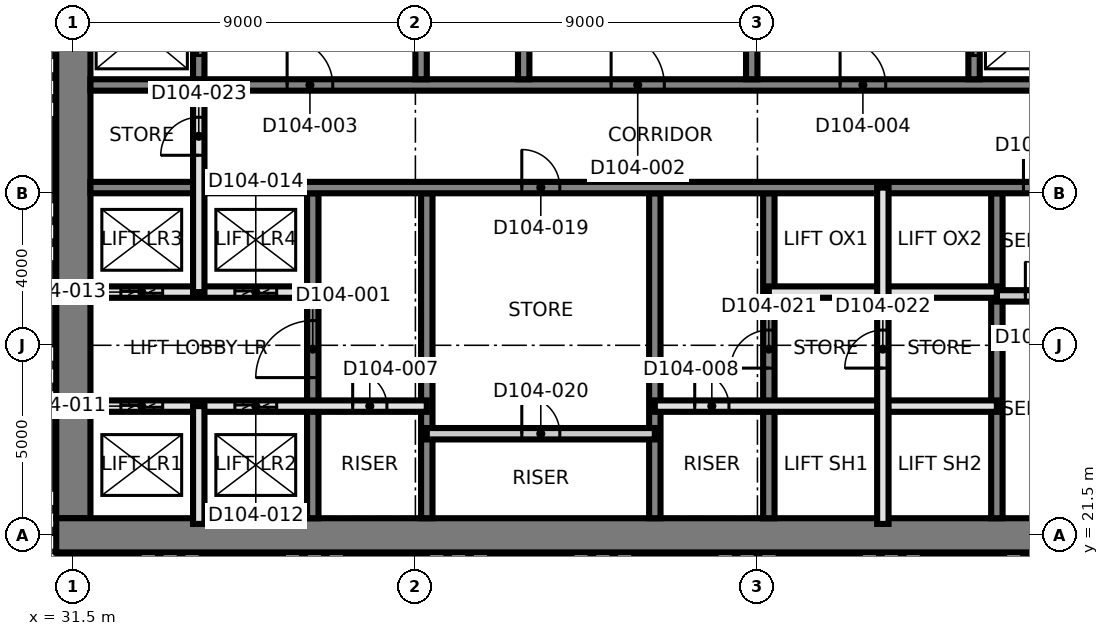
"""IFC4 building model, lengths in metres.
Left out: names, types, materials, properties, quantities, classifications, styles, units other than length and angle.
Written with IfcOpenShell. Run it as: python <this file> out.ifc"""

import sys

from ifc_helpers import new_model, si_unit, direction, frame, frame_2d, origin, place, context, subcontext, project, spatial, rectangle, extrude, element, fill, save


model = new_model("IFC4")
c1 = context("Model", 3, precision=1e-05, world=origin(), true_north=direction((0.0, 1.0)))
c2 = subcontext(c1, "Body", "Model", "MODEL_VIEW")
j1 = project(units=[si_unit("LENGTHUNIT", "METRE"), si_unit("PLANEANGLEUNIT", "RADIAN")], contexts=[c1])
p1 = place(None, origin())
s1 = spatial("IfcSite", under=j1, at=p1, CompositionType="ELEMENT")
p2 = place(p1, origin())
s2 = spatial("IfcBuilding", under=s1, at=p2, CompositionType="ELEMENT")
p3 = place(p2, frame((0.0, 0.0, 13.5)))
s3 = spatial("IfcBuildingStorey", under=s2, at=p3, CompositionType="ELEMENT", Elevation=13.5)
p4 = place(p3, frame((31.5, 21.95, 0.0), z_axis=(0.0, 0.0, 1.0), x_axis=(0.0, 1.0, 0.0)))
e1 = element("IfcWall", 1, at=p4, inside=s3, PredefinedType="SHEAR", context=c2, shape_type="SweptSolid", body=[
    extrude(rectangle(XDim=17.1, YDim=0.9, at=frame_2d((8.55, 0.0))), origin(), (0.0, 0.0, 1.0), 5.0),
])
p5 = place(p3, frame((31.05, 21.5, 0.0), z_axis=(0.0, 0.0, 1.0), x_axis=(1.0, 0.0, 0.0)))
e2 = element("IfcWall", 2, at=p5, inside=s3, PredefinedType="SHEAR", context=c2, shape_type="SweptSolid", body=[
    extrude(rectangle(XDim=27.0, YDim=0.9, at=frame_2d((13.5, 0.0))), origin(), (0.0, 0.0, 1.0), 5.0),
])
p6 = place(p3, frame((37.8, 21.95, 0.0), z_axis=(0.0, 0.0, 1.0), x_axis=(0.0, 1.0, 0.0)))
e3 = element("IfcWall", 3, at=p6, inside=s3, PredefinedType="SHEAR", context=c2, shape_type="SweptSolid", body=[
    extrude(rectangle(XDim=8.55, YDim=0.3, at=frame_2d((4.275, 0.0))), origin(), (0.0, 0.0, 1.0), 5.0),
])
p7 = place(p6, frame((3.7, 0.0, 0.0)))
e4 = element("IfcOpeningElement", 4, at=p7, cuts=e3, PredefinedType="OPENING", context=c2, shape_type="SweptSolid", body=[
    extrude(rectangle(XDim=1.5, YDim=2.1, at=frame_2d((0.75, 1.05))), frame((0.0, 0.16, 0.0), z_axis=(0.0, -1.0, 0.0), x_axis=(1.0, 0.0, 0.0)), (0.0, 0.0, 1.0), 0.32),
])
for number, where, z_axis, x_axis in (
    (5, (40.8, 21.95, 0.0), (0.0, 0.0, 1.0), (0.0, 1.0, 0.0)),
    (6, (46.8, 21.95, 0.0), (0.0, 0.0, 1.0), (0.0, 1.0, 0.0)),
):
    element("IfcWall", number, at=place(p3, frame(where, z_axis=z_axis, x_axis=x_axis)), inside=s3, PredefinedType="SHEAR", context=c2, shape_type="SweptSolid", body=[
        extrude(rectangle(XDim=8.55, YDim=0.3, at=frame_2d((4.275, 0.0))), origin(), (0.0, 0.0, 1.0), 5.0),
    ])
p8 = place(p3, frame((49.8, 21.95, 0.0), z_axis=(0.0, 0.0, 1.0), x_axis=(0.0, 1.0, 0.0)))
e7 = element("IfcWall", 7, at=p8, inside=s3, PredefinedType="SHEAR", context=c2, shape_type="SweptSolid", body=[
    extrude(rectangle(XDim=8.55, YDim=0.3, at=frame_2d((4.275, 0.0))), origin(), (0.0, 0.0, 1.0), 5.0),
])
p9 = place(p8, frame((3.95, 0.0, 0.0)))
e8 = element("IfcOpeningElement", 8, at=p9, cuts=e7, PredefinedType="OPENING", context=c2, shape_type="SweptSolid", body=[
    extrude(rectangle(XDim=1.0, YDim=2.1, at=frame_2d((0.5, 1.05))), frame((0.0, 0.16, 0.0), z_axis=(0.0, -1.0, 0.0), x_axis=(1.0, 0.0, 0.0)), (0.0, 0.0, 1.0), 0.32),
])
p10 = place(p3, frame((55.8, 21.95, 0.0), z_axis=(0.0, 0.0, 1.0), x_axis=(0.0, 1.0, 0.0)))
e9 = element("IfcWall", 9, at=p10, inside=s3, PredefinedType="SHEAR", context=c2, shape_type="SweptSolid", body=[
    extrude(rectangle(XDim=8.55, YDim=0.3, at=frame_2d((4.275, 0.0))), origin(), (0.0, 0.0, 1.0), 5.0),
])
p11 = place(p3, frame((31.95, 30.65, 0.0), z_axis=(0.0, 0.0, 1.0), x_axis=(1.0, 0.0, 0.0)))
e10 = element("IfcWall", 10, at=p11, inside=s3, PredefinedType="SHEAR", context=c2, shape_type="SweptSolid", body=[
    extrude(rectangle(XDim=26.1, YDim=0.3, at=frame_2d((13.05, 0.0))), origin(), (0.0, 0.0, 1.0), 5.0),
])
p12 = place(p11, frame((24.55, 0.0, 0.0)))
e11 = element("IfcOpeningElement", 11, at=p12, cuts=e10, PredefinedType="OPENING", context=c2, shape_type="SweptSolid", body=[
    extrude(rectangle(XDim=1.0, YDim=2.1, at=frame_2d((0.5, 1.05))), frame((0.0, 0.16, 0.0), z_axis=(0.0, -1.0, 0.0), x_axis=(1.0, 0.0, 0.0)), (0.0, 0.0, 1.0), 0.32),
])
p13 = place(p11, frame((11.35, 0.0, 0.0)))
e12 = element("IfcOpeningElement", 12, at=p13, cuts=e10, PredefinedType="OPENING", context=c2, shape_type="SweptSolid", body=[
    extrude(rectangle(XDim=1.0, YDim=2.1, at=frame_2d((0.5, 1.05))), frame((0.0, 0.16, 0.0), z_axis=(0.0, -1.0, 0.0), x_axis=(1.0, 0.0, 0.0)), (0.0, 0.0, 1.0), 0.32),
])
p14 = place(p3, frame((31.95, 33.35, 0.0), z_axis=(0.0, 0.0, 1.0), x_axis=(1.0, 0.0, 0.0)))
e13 = element("IfcWall", 13, at=p14, inside=s3, PredefinedType="SHEAR", context=c2, shape_type="SweptSolid", body=[
    extrude(rectangle(XDim=26.1, YDim=0.3, at=frame_2d((13.05, 0.0))), origin(), (0.0, 0.0, 1.0), 5.0),
])
p15 = place(p14, frame((13.7, 0.0, 0.0)))
e14 = element("IfcOpeningElement", 14, at=p15, cuts=e13, PredefinedType="OPENING", context=c2, shape_type="SweptSolid", body=[
    extrude(rectangle(XDim=1.4, YDim=2.1, at=frame_2d((0.7, 1.05))), frame((0.0, 0.16, 0.0), z_axis=(0.0, -1.0, 0.0), x_axis=(1.0, 0.0, 0.0)), (0.0, 0.0, 1.0), 0.32),
])
p16 = place(p14, frame((5.175, 0.0, 0.0)))
e15 = element("IfcOpeningElement", 15, at=p16, cuts=e13, PredefinedType="OPENING", context=c2, shape_type="SweptSolid", body=[
    extrude(rectangle(XDim=1.2, YDim=2.1, at=frame_2d((0.6, 1.05))), frame((0.0, 0.16, 0.0), z_axis=(0.0, -1.0, 0.0), x_axis=(1.0, 0.0, 0.0)), (0.0, 0.0, 1.0), 0.32),
])
p17 = place(p14, frame((19.725, 0.0, 0.0)))
e16 = element("IfcOpeningElement", 16, at=p17, cuts=e13, PredefinedType="OPENING", context=c2, shape_type="SweptSolid", body=[
    extrude(rectangle(XDim=1.2, YDim=2.1, at=frame_2d((0.6, 1.05))), frame((0.0, 0.16, 0.0), z_axis=(0.0, -1.0, 0.0), x_axis=(1.0, 0.0, 0.0)), (0.0, 0.0, 1.0), 0.32),
])
for number, where, z_axis, x_axis in (
    (17, (40.65, 33.5, 0.0), (0.0, 0.0, 1.0), (0.0, 1.0, 0.0)),
    (18, (43.35, 33.5, 0.0), (0.0, 0.0, 1.0), (0.0, 1.0, 0.0)),
):
    element("IfcWall", number, at=place(p3, frame(where, z_axis=z_axis, x_axis=x_axis)), inside=s3, PredefinedType="SHEAR", context=c2, shape_type="SweptSolid", body=[
        extrude(rectangle(XDim=5.55, YDim=0.3, at=frame_2d((2.775, 0.0))), origin(), (0.0, 0.0, 1.0), 5.0),
    ])
p18 = place(p3, frame((34.8, 33.5, 0.0), z_axis=(0.0, 0.0, 1.0), x_axis=(0.0, 1.0, 0.0)))
e19 = element("IfcWall", 19, at=p18, inside=s3, PredefinedType="SHEAR", context=c2, shape_type="SweptSolid", body=[
    extrude(rectangle(XDim=2.55, YDim=0.3, at=frame_2d((1.275, 0.0))), origin(), (0.0, 0.0, 1.0), 5.0),
])
p19 = place(p18, frame((0.625, 0.0, 0.0)))
e20 = element("IfcOpeningElement", 20, at=p19, cuts=e19, PredefinedType="OPENING", context=c2, shape_type="SweptSolid", body=[
    extrude(rectangle(XDim=1.3, YDim=2.4, at=frame_2d((0.65, 1.2))), frame((0.0, 0.16, 0.0), z_axis=(0.0, -1.0, 0.0), x_axis=(1.0, 0.0, 0.0)), (0.0, 0.0, 1.0), 0.32),
])
p20 = place(p3, frame((49.35, 33.5, 0.0), z_axis=(0.0, 0.0, 1.0), x_axis=(0.0, 1.0, 0.0)))
e21 = element("IfcWall", 21, at=p20, inside=s3, PredefinedType="SHEAR", context=c2, shape_type="SweptSolid", body=[
    extrude(rectangle(XDim=5.55, YDim=0.3, at=frame_2d((2.775, 0.0))), origin(), (0.0, 0.0, 1.0), 5.0),
])
p21 = place(p3, frame((55.2, 33.5, 0.0), z_axis=(0.0, 0.0, 1.0), x_axis=(0.0, 1.0, 0.0)))
e22 = element("IfcWall", 22, at=p21, inside=s3, PredefinedType="SHEAR", context=c2, shape_type="SweptSolid", body=[
    extrude(rectangle(XDim=2.55, YDim=0.3, at=frame_2d((1.275, 0.0))), origin(), (0.0, 0.0, 1.0), 5.0),
])
p22 = place(p21, frame((0.625, 0.0, 0.0)))
e23 = element("IfcOpeningElement", 23, at=p22, cuts=e22, PredefinedType="OPENING", context=c2, shape_type="SweptSolid", body=[
    extrude(rectangle(XDim=1.3, YDim=2.4, at=frame_2d((0.65, 1.2))), frame((0.0, 0.16, 0.0), z_axis=(0.0, -1.0, 0.0), x_axis=(1.0, 0.0, 0.0)), (0.0, 0.0, 1.0), 0.32),
])
p23 = place(p3, frame((40.8, 24.173, 0.0), z_axis=(0.0, 0.0, 1.0), x_axis=(1.0, 0.0, 0.0)))
e24 = element("IfcWall", 24, at=p23, inside=s3, PredefinedType="PARTITIONING", context=c2, shape_type="SweptSolid", body=[
    extrude(rectangle(XDim=6.0, YDim=0.3, at=frame_2d((3.0, 0.0))), origin(), (0.0, 0.0, 1.0), 4.7),
])
p24 = place(p23, frame((2.5, 0.0, 0.0)))
e25 = element("IfcOpeningElement", 25, at=p24, cuts=e24, PredefinedType="OPENING", context=c2, shape_type="SweptSolid", body=[
    extrude(rectangle(XDim=1.0, YDim=2.1, at=frame_2d((0.5, 1.05))), frame((0.0, 0.16, 0.0), z_axis=(0.0, -1.0, 0.0), x_axis=(1.0, 0.0, 0.0)), (0.0, 0.0, 1.0), 0.32),
])
p25 = place(p3, frame((31.8, 24.9, 0.0), z_axis=(0.0, 0.0, 1.0), x_axis=(1.0, 0.0, 0.0)))
e26 = element("IfcWall", 26, at=p25, inside=s3, PredefinedType="SOLIDWALL", context=c2, shape_type="SweptSolid", body=[
    extrude(rectangle(XDim=9.0, YDim=0.3, at=frame_2d((4.5, 0.0))), origin(), (0.0, 0.0, 1.0), 4.7),
])
p26 = place(p25, frame((7.05, 0.0, 0.0)))
e27 = element("IfcOpeningElement", 27, at=p26, cuts=e26, PredefinedType="OPENING", context=c2, shape_type="SweptSolid", body=[
    extrude(rectangle(XDim=0.9, YDim=2.1, at=frame_2d((0.45, 1.05))), frame((0.0, 0.16, 0.0), z_axis=(0.0, -1.0, 0.0), x_axis=(1.0, 0.0, 0.0)), (0.0, 0.0, 1.0), 0.32),
])
p27 = place(p25, frame((0.95, 0.0, 0.0)))
e28 = element("IfcOpeningElement", 28, at=p27, cuts=e26, PredefinedType="OPENING", context=c2, shape_type="SweptSolid", body=[
    extrude(rectangle(XDim=1.1, YDim=2.4, at=frame_2d((0.55, 1.2))), frame((0.0, 0.16, 0.0), z_axis=(0.0, -1.0, 0.0), x_axis=(1.0, 0.0, 0.0)), (0.0, 0.0, 1.0), 0.32),
])
p28 = place(p25, frame((3.95, 0.0, 0.0)))
e29 = element("IfcOpeningElement", 29, at=p28, cuts=e26, PredefinedType="OPENING", context=c2, shape_type="SweptSolid", body=[
    extrude(rectangle(XDim=1.1, YDim=2.4, at=frame_2d((0.55, 1.2))), frame((0.0, 0.16, 0.0), z_axis=(0.0, -1.0, 0.0), x_axis=(1.0, 0.0, 0.0)), (0.0, 0.0, 1.0), 0.32),
])
p29 = place(p3, frame((46.8, 24.9, 0.0), z_axis=(0.0, 0.0, 1.0), x_axis=(1.0, 0.0, 0.0)))
e30 = element("IfcWall", 30, at=p29, inside=s3, PredefinedType="SOLIDWALL", context=c2, shape_type="SweptSolid", body=[
    extrude(rectangle(XDim=9.0, YDim=0.3, at=frame_2d((4.5, 0.0))), origin(), (0.0, 0.0, 1.0), 4.7),
])
p30 = place(p29, frame((1.05, 0.0, 0.0)))
e31 = element("IfcOpeningElement", 31, at=p30, cuts=e30, PredefinedType="OPENING", context=c2, shape_type="SweptSolid", body=[
    extrude(rectangle(XDim=0.9, YDim=2.1, at=frame_2d((0.45, 1.05))), frame((0.0, 0.16, 0.0), z_axis=(0.0, -1.0, 0.0), x_axis=(1.0, 0.0, 0.0)), (0.0, 0.0, 1.0), 0.32),
])
p31 = place(p3, frame((55.8, 27.8, 0.0), z_axis=(0.0, 0.0, 1.0), x_axis=(1.0, 0.0, 0.0)))
e32 = element("IfcWall", 32, at=p31, inside=s3, PredefinedType="PARTITIONING", context=c2, shape_type="SweptSolid", body=[
    extrude(rectangle(XDim=2.4, YDim=0.3, at=frame_2d((1.2, 0.0))), origin(), (0.0, 0.0, 1.0), 4.7),
])
p32 = place(p31, frame((0.75, 0.0, 0.0)))
e33 = element("IfcOpeningElement", 33, at=p32, cuts=e32, PredefinedType="OPENING", context=c2, shape_type="SweptSolid", body=[
    extrude(rectangle(XDim=0.9, YDim=2.1, at=frame_2d((0.45, 1.05))), frame((0.0, 0.16, 0.0), z_axis=(0.0, -1.0, 0.0), x_axis=(1.0, 0.0, 0.0)), (0.0, 0.0, 1.0), 0.32),
])
p33 = place(p3, frame((31.8, 27.9, 0.0), z_axis=(0.0, 0.0, 1.0), x_axis=(1.0, 0.0, 0.0)))
e34 = element("IfcWall", 34, at=p33, inside=s3, PredefinedType="SOLIDWALL", context=c2, shape_type="SweptSolid", body=[
    extrude(rectangle(XDim=6.0, YDim=0.3, at=frame_2d((3.0, 0.0))), origin(), (0.0, 0.0, 1.0), 4.7),
])
p34 = place(p33, frame((0.95, 0.0, 0.0)))
e35 = element("IfcOpeningElement", 35, at=p34, cuts=e34, PredefinedType="OPENING", context=c2, shape_type="SweptSolid", body=[
    extrude(rectangle(XDim=1.1, YDim=2.4, at=frame_2d((0.55, 1.2))), frame((0.0, 0.16, 0.0), z_axis=(0.0, -1.0, 0.0), x_axis=(1.0, 0.0, 0.0)), (0.0, 0.0, 1.0), 0.32),
])
p35 = place(p33, frame((3.95, 0.0, 0.0)))
e36 = element("IfcOpeningElement", 36, at=p35, cuts=e34, PredefinedType="OPENING", context=c2, shape_type="SweptSolid", body=[
    extrude(rectangle(XDim=1.1, YDim=2.4, at=frame_2d((0.55, 1.2))), frame((0.0, 0.16, 0.0), z_axis=(0.0, -1.0, 0.0), x_axis=(1.0, 0.0, 0.0)), (0.0, 0.0, 1.0), 0.32),
])
p36 = place(p3, frame((49.8, 27.9, 0.0), z_axis=(0.0, 0.0, 1.0), x_axis=(1.0, 0.0, 0.0)))
e37 = element("IfcWall", 37, at=p36, inside=s3, PredefinedType="SOLIDWALL", context=c2, shape_type="SweptSolid", body=[
    extrude(rectangle(XDim=6.0, YDim=0.3, at=frame_2d((3.0, 0.0))), origin(), (0.0, 0.0, 1.0), 4.7),
])
p37 = place(p3, frame((34.8, 21.8, 0.0), z_axis=(0.0, 0.0, 1.0), x_axis=(0.0, 1.0, 0.0)))
e38 = element("IfcWall", 38, at=p37, inside=s3, PredefinedType="SOLIDWALL", context=c2, shape_type="SweptSolid", body=[
    extrude(rectangle(XDim=3.1, YDim=0.3, at=frame_2d((1.55, 0.0))), origin(), (0.0, 0.0, 1.0), 4.7),
])
p38 = place(p3, frame((34.8, 27.9, 0.0), z_axis=(0.0, 0.0, 1.0), x_axis=(0.0, 1.0, 0.0)))
e39 = element("IfcWall", 39, at=p38, inside=s3, PredefinedType="SOLIDWALL", context=c2, shape_type="SweptSolid", body=[
    extrude(rectangle(XDim=5.45, YDim=0.3, at=frame_2d((2.725, 0.0))), origin(), (0.0, 0.0, 1.0), 4.7),
])
p39 = place(p38, frame((3.6, 0.0, 0.0)))
e40 = element("IfcOpeningElement", 40, at=p39, cuts=e39, PredefinedType="OPENING", context=c2, shape_type="SweptSolid", body=[
    extrude(rectangle(XDim=1.0, YDim=2.1, at=frame_2d((0.5, 1.05))), frame((0.0, 0.16, 0.0), z_axis=(0.0, -1.0, 0.0), x_axis=(1.0, 0.0, 0.0)), (0.0, 0.0, 1.0), 0.32),
])
p40 = place(p3, frame((52.8, 21.8, 0.0), z_axis=(0.0, 0.0, 1.0), x_axis=(0.0, 1.0, 0.0)))
e41 = element("IfcWall", 41, at=p40, inside=s3, PredefinedType="SOLIDWALL", context=c2, shape_type="SweptSolid", body=[
    extrude(rectangle(XDim=8.85, YDim=0.3, at=frame_2d((4.425, 0.0))), origin(), (0.0, 0.0, 1.0), 4.7),
])
p41 = place(p40, frame((4.1, 0.0, 0.0)))
e42 = element("IfcOpeningElement", 42, at=p41, cuts=e41, PredefinedType="OPENING", context=c2, shape_type="SweptSolid", body=[
    extrude(rectangle(XDim=1.0, YDim=2.1, at=frame_2d((0.5, 1.05))), frame((0.0, 0.16, 0.0), z_axis=(0.0, -1.0, 0.0), x_axis=(1.0, 0.0, 0.0)), (0.0, 0.0, 1.0), 0.32),
])
p42 = place(p7, origin())
e43 = element("IfcDoor", 43, at=p42, inside=s3, OperationType="SINGLE_SWING_LEFT", PredefinedType="DOOR", context=c2, shape_type="SweptSolid", body=[
    extrude(rectangle(XDim=1.5, YDim=2.1, at=frame_2d((0.75, 1.05))), frame((0.0, 0.025, 0.0), z_axis=(0.0, -1.0, 0.0), x_axis=(1.0, 0.0, 0.0)), (0.0, 0.0, 1.0), 0.05),
])
fill(e4, e43)
p43 = place(p15, origin())
e44 = element("IfcDoor", 44, at=p43, inside=s3, OperationType="SINGLE_SWING_RIGHT", PredefinedType="DOOR", context=c2, shape_type="SweptSolid", body=[
    extrude(rectangle(XDim=1.4, YDim=2.1, at=frame_2d((0.7, 1.05))), frame((0.0, 0.025, 0.0), z_axis=(0.0, -1.0, 0.0), x_axis=(1.0, 0.0, 0.0)), (0.0, 0.0, 1.0), 0.05),
])
fill(e14, e44)
p44 = place(p16, origin())
e45 = element("IfcDoor", 45, at=p44, inside=s3, OperationType="SINGLE_SWING_LEFT", PredefinedType="DOOR", context=c2, shape_type="SweptSolid", body=[
    extrude(rectangle(XDim=1.2, YDim=2.1, at=frame_2d((0.6, 1.05))), frame((0.0, 0.025, 0.0), z_axis=(0.0, -1.0, 0.0), x_axis=(1.0, 0.0, 0.0)), (0.0, 0.0, 1.0), 0.05),
])
fill(e15, e45)
p45 = place(p17, origin())
e46 = element("IfcDoor", 46, at=p45, inside=s3, OperationType="SINGLE_SWING_RIGHT", PredefinedType="DOOR", context=c2, shape_type="SweptSolid", body=[
    extrude(rectangle(XDim=1.2, YDim=2.1, at=frame_2d((0.6, 1.05))), frame((0.0, 0.025, 0.0), z_axis=(0.0, -1.0, 0.0), x_axis=(1.0, 0.0, 0.0)), (0.0, 0.0, 1.0), 0.05),
])
fill(e16, e46)
p46 = place(p26, origin())
e47 = element("IfcDoor", 47, at=p46, inside=s3, OperationType="SINGLE_SWING_LEFT", PredefinedType="DOOR", context=c2, shape_type="SweptSolid", body=[
    extrude(rectangle(XDim=0.9, YDim=2.1, at=frame_2d((0.45, 1.05))), frame((0.0, 0.025, 0.0), z_axis=(0.0, -1.0, 0.0), x_axis=(1.0, 0.0, 0.0)), (0.0, 0.0, 1.0), 0.05),
])
fill(e27, e47)
p47 = place(p30, origin())
e48 = element("IfcDoor", 48, at=p47, inside=s3, OperationType="SINGLE_SWING_RIGHT", PredefinedType="DOOR", context=c2, shape_type="SweptSolid", body=[
    extrude(rectangle(XDim=0.9, YDim=2.1, at=frame_2d((0.45, 1.05))), frame((0.0, 0.025, 0.0), z_axis=(0.0, -1.0, 0.0), x_axis=(1.0, 0.0, 0.0)), (0.0, 0.0, 1.0), 0.05),
])
fill(e31, e48)
p48 = place(p12, origin())
e49 = element("IfcDoor", 49, at=p48, inside=s3, OperationType="SINGLE_SWING_LEFT", PredefinedType="DOOR", context=c2, shape_type="SweptSolid", body=[
    extrude(rectangle(XDim=1.0, YDim=2.1, at=frame_2d((0.5, 1.05))), frame((0.0, 0.025, 0.0), z_axis=(0.0, -1.0, 0.0), x_axis=(1.0, 0.0, 0.0)), (0.0, 0.0, 1.0), 0.05),
])
fill(e11, e49)
p49 = place(p32, origin())
e50 = element("IfcDoor", 50, at=p49, inside=s3, OperationType="SINGLE_SWING_RIGHT", PredefinedType="DOOR", context=c2, shape_type="SweptSolid", body=[
    extrude(rectangle(XDim=0.9, YDim=2.1, at=frame_2d((0.45, 1.05))), frame((0.0, 0.025, 0.0), z_axis=(0.0, -1.0, 0.0), x_axis=(1.0, 0.0, 0.0)), (0.0, 0.0, 1.0), 0.05),
])
fill(e33, e50)
p50 = place(p27, origin())
e51 = element("IfcDoor", 51, at=p50, inside=s3, OperationType="SLIDING_TO_LEFT", PredefinedType="DOOR", context=c2, shape_type="SweptSolid", body=[
    extrude(rectangle(XDim=1.1, YDim=2.4, at=frame_2d((0.55, 1.2))), frame((0.0, 0.025, 0.0), z_axis=(0.0, -1.0, 0.0), x_axis=(1.0, 0.0, 0.0)), (0.0, 0.0, 1.0), 0.05),
])
fill(e28, e51)
p51 = place(p28, origin())
e52 = element("IfcDoor", 52, at=p51, inside=s3, OperationType="SLIDING_TO_LEFT", PredefinedType="DOOR", context=c2, shape_type="SweptSolid", body=[
    extrude(rectangle(XDim=1.1, YDim=2.4, at=frame_2d((0.55, 1.2))), frame((0.0, 0.025, 0.0), z_axis=(0.0, -1.0, 0.0), x_axis=(1.0, 0.0, 0.0)), (0.0, 0.0, 1.0), 0.05),
])
fill(e29, e52)
p52 = place(p34, origin())
e53 = element("IfcDoor", 53, at=p52, inside=s3, OperationType="SLIDING_TO_LEFT", PredefinedType="DOOR", context=c2, shape_type="SweptSolid", body=[
    extrude(rectangle(XDim=1.1, YDim=2.4, at=frame_2d((0.55, 1.2))), frame((0.0, 0.025, 0.0), z_axis=(0.0, -1.0, 0.0), x_axis=(1.0, 0.0, 0.0)), (0.0, 0.0, 1.0), 0.05),
])
fill(e35, e53)
p53 = place(p35, origin())
e54 = element("IfcDoor", 54, at=p53, inside=s3, OperationType="SLIDING_TO_LEFT", PredefinedType="DOOR", context=c2, shape_type="SweptSolid", body=[
    extrude(rectangle(XDim=1.1, YDim=2.4, at=frame_2d((0.55, 1.2))), frame((0.0, 0.025, 0.0), z_axis=(0.0, -1.0, 0.0), x_axis=(1.0, 0.0, 0.0)), (0.0, 0.0, 1.0), 0.05),
])
fill(e36, e54)
p54 = place(p19, origin())
e55 = element("IfcDoor", 55, at=p54, inside=s3, OperationType="SLIDING_TO_LEFT", PredefinedType="DOOR", context=c2, shape_type="SweptSolid", body=[
    extrude(rectangle(XDim=1.3, YDim=2.4, at=frame_2d((0.65, 1.2))), frame((0.0, 0.025, 0.0), z_axis=(0.0, -1.0, 0.0), x_axis=(1.0, 0.0, 0.0)), (0.0, 0.0, 1.0), 0.05),
])
fill(e20, e55)
p55 = place(p22, origin())
e56 = element("IfcDoor", 56, at=p55, inside=s3, OperationType="SLIDING_TO_LEFT", PredefinedType="DOOR", context=c2, shape_type="SweptSolid", body=[
    extrude(rectangle(XDim=1.3, YDim=2.4, at=frame_2d((0.65, 1.2))), frame((0.0, 0.025, 0.0), z_axis=(0.0, -1.0, 0.0), x_axis=(1.0, 0.0, 0.0)), (0.0, 0.0, 1.0), 0.05),
])
fill(e23, e56)
p56 = place(p13, origin())
e57 = element("IfcDoor", 57, at=p56, inside=s3, OperationType="SINGLE_SWING_LEFT", PredefinedType="DOOR", context=c2, shape_type="SweptSolid", body=[
    extrude(rectangle(XDim=1.0, YDim=2.1, at=frame_2d((0.5, 1.05))), frame((0.0, 0.025, 0.0), z_axis=(0.0, -1.0, 0.0), x_axis=(1.0, 0.0, 0.0)), (0.0, 0.0, 1.0), 0.05),
])
fill(e12, e57)
p57 = place(p24, origin())
e58 = element("IfcDoor", 58, at=p57, inside=s3, OperationType="SINGLE_SWING_RIGHT", PredefinedType="DOOR", context=c2, shape_type="SweptSolid", body=[
    extrude(rectangle(XDim=1.0, YDim=2.1, at=frame_2d((0.5, 1.05))), frame((0.0, 0.025, 0.0), z_axis=(0.0, -1.0, 0.0), x_axis=(1.0, 0.0, 0.0)), (0.0, 0.0, 1.0), 0.05),
])
fill(e25, e58)
p58 = place(p9, origin())
e59 = element("IfcDoor", 59, at=p58, inside=s3, OperationType="SINGLE_SWING_LEFT", PredefinedType="DOOR", context=c2, shape_type="SweptSolid", body=[
    extrude(rectangle(XDim=1.0, YDim=2.1, at=frame_2d((0.5, 1.05))), frame((0.0, 0.025, 0.0), z_axis=(0.0, -1.0, 0.0), x_axis=(1.0, 0.0, 0.0)), (0.0, 0.0, 1.0), 0.05),
])
fill(e8, e59)
p59 = place(p41, origin())
e60 = element("IfcDoor", 60, at=p59, inside=s3, OperationType="SINGLE_SWING_RIGHT", PredefinedType="DOOR", context=c2, shape_type="SweptSolid", body=[
    extrude(rectangle(XDim=1.0, YDim=2.1, at=frame_2d((0.5, 1.05))), frame((0.0, 0.025, 0.0), z_axis=(0.0, -1.0, 0.0), x_axis=(1.0, 0.0, 0.0)), (0.0, 0.0, 1.0), 0.05),
])
fill(e42, e60)
p60 = place(p39, origin())
e61 = element("IfcDoor", 61, at=p60, inside=s3, OperationType="SINGLE_SWING_LEFT", PredefinedType="DOOR", context=c2, shape_type="SweptSolid", body=[
    extrude(rectangle(XDim=1.0, YDim=2.1, at=frame_2d((0.5, 1.05))), frame((0.0, 0.025, 0.0), z_axis=(0.0, -1.0, 0.0), x_axis=(1.0, 0.0, 0.0)), (0.0, 0.0, 1.0), 0.05),
])
fill(e40, e61)
save(model, sys.argv[1])
